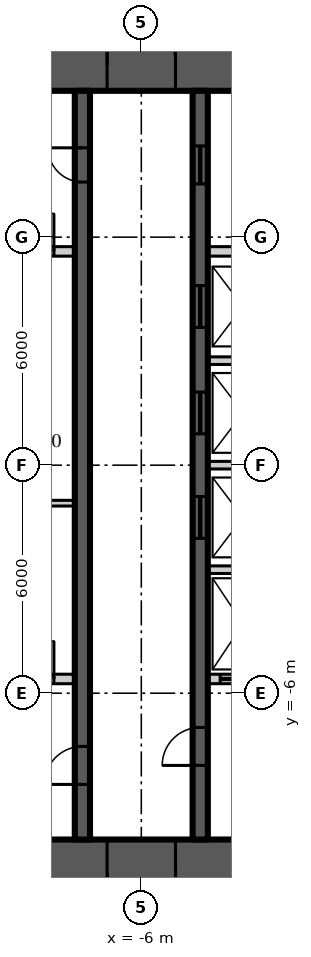
"""IFC4 building model, lengths in metres.
Left out: names, types, materials, properties, quantities, classifications, styles, units other than length and angle.
Written with IfcOpenShell. Run it as: python <this file> out.ifc"""

import sys

from ifc_helpers import new_model, si_unit, direction, frame, frame_2d, origin, place, context, subcontext, project, spatial, rectangle, extrude, element, fill, save


model = new_model("IFC4")
c1 = context("Model", 3, precision=1e-05, world=origin(), true_north=direction((0.0, 1.0)))
c2 = subcontext(c1, "Body", "Model", "MODEL_VIEW")
j1 = project(units=[si_unit("LENGTHUNIT", "METRE"), si_unit("PLANEANGLEUNIT", "RADIAN")], contexts=[c1])
p1 = place(None, origin())
s1 = spatial("IfcSite", under=j1, at=p1, CompositionType="ELEMENT")
p2 = place(p1, origin())
s2 = spatial("IfcBuilding", under=s1, at=p2, CompositionType="ELEMENT")
p3 = place(p2, frame((0.0, 0.0, 139.8)))
s3 = spatial("IfcBuildingStorey", under=s2, at=p3, CompositionType="ELEMENT", Elevation=139.8)
p4 = place(p3, frame((-11.15, 10.5, 0.0), z_axis=(0.0, 0.0, 1.0), x_axis=(1.0, 0.0, 0.0)))
e1 = element("IfcWall", 1, at=p4, inside=s3, PredefinedType="SHEAR", context=c2, shape_type="SweptSolid", body=[
    extrude(rectangle(XDim=22.3, YDim=1.3, at=frame_2d((11.15, 0.0))), origin(), (0.0, 0.0, 1.0), 3.9),
])
p5 = place(p4, frame((4.25, 0.0, 0.0)))
e2 = element("IfcOpeningElement", 2, at=p5, cuts=e1, PredefinedType="OPENING", context=c2, shape_type="SweptSolid", body=[
    extrude(rectangle(XDim=1.8, YDim=2.2, at=frame_2d((0.9, 1.1))), frame((0.0, 0.66, 0.0), z_axis=(0.0, -1.0, 0.0), x_axis=(1.0, 0.0, 0.0)), (0.0, 0.0, 1.0), 1.32),
])
p6 = place(p4, frame((16.25, 0.0, 0.0)))
e3 = element("IfcOpeningElement", 3, at=p6, cuts=e1, PredefinedType="OPENING", context=c2, shape_type="SweptSolid", body=[
    extrude(rectangle(XDim=1.8, YDim=2.2, at=frame_2d((0.9, 1.1))), frame((0.0, 0.66, 0.0), z_axis=(0.0, -1.0, 0.0), x_axis=(1.0, 0.0, 0.0)), (0.0, 0.0, 1.0), 1.32),
])
p7 = place(p3, frame((11.15, -10.5, 0.0), z_axis=(0.0, 0.0, 1.0), x_axis=(-1.0, 0.0, 0.0)))
e4 = element("IfcWall", 4, at=p7, inside=s3, PredefinedType="SHEAR", context=c2, shape_type="SweptSolid", body=[
    extrude(rectangle(XDim=22.3, YDim=1.3, at=frame_2d((11.15, 0.0))), origin(), (0.0, 0.0, 1.0), 3.9),
])
p8 = place(p7, frame((16.25, 0.0, 0.0)))
e5 = element("IfcOpeningElement", 5, at=p8, cuts=e4, PredefinedType="OPENING", context=c2, shape_type="SweptSolid", body=[
    extrude(rectangle(XDim=1.8, YDim=2.2, at=frame_2d((0.9, 1.1))), frame((0.0, 0.66, 0.0), z_axis=(0.0, -1.0, 0.0), x_axis=(1.0, 0.0, 0.0)), (0.0, 0.0, 1.0), 1.32),
])
p9 = place(p7, frame((4.25, 0.0, 0.0)))
e6 = element("IfcOpeningElement", 6, at=p9, cuts=e4, PredefinedType="OPENING", context=c2, shape_type="SweptSolid", body=[
    extrude(rectangle(XDim=1.8, YDim=2.2, at=frame_2d((0.9, 1.1))), frame((0.0, 0.66, 0.0), z_axis=(0.0, -1.0, 0.0), x_axis=(1.0, 0.0, 0.0)), (0.0, 0.0, 1.0), 1.32),
])
p10 = place(p3, frame((-7.55, -9.85, 0.0), z_axis=(0.0, 0.0, 1.0), x_axis=(0.0, 1.0, 0.0)))
e7 = element("IfcWall", 7, at=p10, inside=s3, PredefinedType="SHEAR", context=c2, shape_type="SweptSolid", body=[
    extrude(rectangle(XDim=19.7, YDim=0.4, at=frame_2d((9.85, 0.0))), origin(), (0.0, 0.0, 1.0), 3.9),
])
p11 = place(p10, frame((1.45, 0.0, 0.0)))
e8 = element("IfcOpeningElement", 8, at=p11, cuts=e7, PredefinedType="OPENING", context=c2, shape_type="SweptSolid", body=[
    extrude(rectangle(XDim=1.0, YDim=2.2, at=frame_2d((0.5, 1.1))), frame((0.0, 0.21, 0.0), z_axis=(0.0, -1.0, 0.0), x_axis=(1.0, 0.0, 0.0)), (0.0, 0.0, 1.0), 0.42),
])
p12 = place(p10, frame((17.3, 0.0, 0.0)))
e9 = element("IfcOpeningElement", 9, at=p12, cuts=e7, PredefinedType="OPENING", context=c2, shape_type="SweptSolid", body=[
    extrude(rectangle(XDim=0.9, YDim=2.1, at=frame_2d((0.45, 1.05))), frame((0.0, 0.21, 0.0), z_axis=(0.0, -1.0, 0.0), x_axis=(1.0, 0.0, 0.0)), (0.0, 0.0, 1.0), 0.42),
])
p13 = place(p3, frame((-4.45, -9.85, 0.0), z_axis=(0.0, 0.0, 1.0), x_axis=(0.0, 1.0, 0.0)))
e10 = element("IfcWall", 10, at=p13, inside=s3, PredefinedType="SHEAR", context=c2, shape_type="SweptSolid", body=[
    extrude(rectangle(XDim=19.7, YDim=0.4, at=frame_2d((9.85, 0.0))), origin(), (0.0, 0.0, 1.0), 3.9),
])
p14 = place(p13, frame((1.95, 0.0, 0.0)))
e11 = element("IfcOpeningElement", 11, at=p14, cuts=e10, PredefinedType="OPENING", context=c2, shape_type="SweptSolid", body=[
    extrude(rectangle(XDim=1.0, YDim=2.2, at=frame_2d((0.5, 1.1))), frame((0.0, 0.21, 0.0), z_axis=(0.0, -1.0, 0.0), x_axis=(1.0, 0.0, 0.0)), (0.0, 0.0, 1.0), 0.42),
])
p15 = place(p13, frame((17.25, 0.0, 0.0)))
e12 = element("IfcOpeningElement", 12, at=p15, cuts=e10, PredefinedType="OPENING", context=c2, shape_type="SweptSolid", body=[
    extrude(rectangle(XDim=1.0, YDim=2.1, at=frame_2d((0.5, 1.05))), frame((0.0, 0.21, 0.0), z_axis=(0.0, -1.0, 0.0), x_axis=(1.0, 0.0, 0.0)), (0.0, 0.0, 1.0), 0.42),
])
p16 = place(p13, frame((7.925, 0.0, 0.0)))
e13 = element("IfcOpeningElement", 13, at=p16, cuts=e10, PredefinedType="OPENING", context=c2, shape_type="SweptSolid", body=[
    extrude(rectangle(XDim=1.1, YDim=2.2, at=frame_2d((0.55, 1.1))), frame((0.0, 0.21, 0.0), z_axis=(0.0, -1.0, 0.0), x_axis=(1.0, 0.0, 0.0)), (0.0, 0.0, 1.0), 0.42),
])
p17 = place(p13, frame((10.675, 0.0, 0.0)))
e14 = element("IfcOpeningElement", 14, at=p17, cuts=e10, PredefinedType="OPENING", context=c2, shape_type="SweptSolid", body=[
    extrude(rectangle(XDim=1.1, YDim=2.2, at=frame_2d((0.55, 1.1))), frame((0.0, 0.21, 0.0), z_axis=(0.0, -1.0, 0.0), x_axis=(1.0, 0.0, 0.0)), (0.0, 0.0, 1.0), 0.42),
])
p18 = place(p13, frame((13.475, 0.0, 0.0)))
e15 = element("IfcOpeningElement", 15, at=p18, cuts=e10, PredefinedType="OPENING", context=c2, shape_type="SweptSolid", body=[
    extrude(rectangle(XDim=1.1, YDim=2.2, at=frame_2d((0.55, 1.1))), frame((0.0, 0.21, 0.0), z_axis=(0.0, -1.0, 0.0), x_axis=(1.0, 0.0, 0.0)), (0.0, 0.0, 1.0), 0.42),
])
p19 = place(p3, frame((-9.85, 5.625, 0.0), z_axis=(0.0, 0.0, 1.0), x_axis=(1.0, 0.0, 0.0)))
e16 = element("IfcWall", 16, at=p19, inside=s3, PredefinedType="SOLIDWALL", context=c2, shape_type="SweptSolid", body=[
    extrude(rectangle(XDim=2.1, YDim=0.25, at=frame_2d((1.05, 0.0))), origin(), (0.0, 0.0, 1.0), 3.7),
])
p20 = place(p19, frame((0.55, 0.0, 0.0)))
e17 = element("IfcOpeningElement", 17, at=p20, cuts=e16, PredefinedType="OPENING", context=c2, shape_type="SweptSolid", body=[
    extrude(rectangle(XDim=1.0, YDim=2.2, at=frame_2d((0.5, 1.1))), frame((0.0, 0.135, 0.0), z_axis=(0.0, -1.0, 0.0), x_axis=(1.0, 0.0, 0.0)), (0.0, 0.0, 1.0), 0.27),
])
p21 = place(p3, frame((-4.25, 5.625, 0.0), z_axis=(0.0, 0.0, 1.0), x_axis=(1.0, 0.0, 0.0)))
e18 = element("IfcWall", 18, at=p21, inside=s3, PredefinedType="SOLIDWALL", context=c2, shape_type="SweptSolid", body=[
    extrude(rectangle(XDim=1.85, YDim=0.25, at=frame_2d((0.925, 0.0))), origin(), (0.0, 0.0, 1.0), 3.7),
])
p22 = place(p3, frame((-9.85, -5.625, 0.0), z_axis=(0.0, 0.0, 1.0), x_axis=(1.0, 0.0, 0.0)))
e19 = element("IfcWall", 19, at=p22, inside=s3, PredefinedType="SOLIDWALL", context=c2, shape_type="SweptSolid", body=[
    extrude(rectangle(XDim=2.1, YDim=0.25, at=frame_2d((1.05, 0.0))), origin(), (0.0, 0.0, 1.0), 3.7),
])
p23 = place(p22, frame((0.55, 0.0, 0.0)))
e20 = element("IfcOpeningElement", 20, at=p23, cuts=e19, PredefinedType="OPENING", context=c2, shape_type="SweptSolid", body=[
    extrude(rectangle(XDim=1.0, YDim=2.2, at=frame_2d((0.5, 1.1))), frame((0.0, 0.135, 0.0), z_axis=(0.0, -1.0, 0.0), x_axis=(1.0, 0.0, 0.0)), (0.0, 0.0, 1.0), 0.27),
])
p24 = place(p3, frame((-4.25, -5.625, 0.0), z_axis=(0.0, 0.0, 1.0), x_axis=(1.0, 0.0, 0.0)))
e21 = element("IfcWall", 21, at=p24, inside=s3, PredefinedType="SOLIDWALL", context=c2, shape_type="SweptSolid", body=[
    extrude(rectangle(XDim=1.85, YDim=0.25, at=frame_2d((0.925, 0.0))), origin(), (0.0, 0.0, 1.0), 3.7),
])
p25 = place(p24, frame((0.325, 0.0, 0.0)))
e22 = element("IfcOpeningElement", 22, at=p25, cuts=e21, PredefinedType="OPENING", context=c2, shape_type="SweptSolid", body=[
    extrude(rectangle(XDim=1.2, YDim=2.2, at=frame_2d((0.6, 1.1))), frame((0.0, 0.135, 0.0), z_axis=(0.0, -1.0, 0.0), x_axis=(1.0, 0.0, 0.0)), (0.0, 0.0, 1.0), 0.27),
])
for number, where, z_axis, x_axis in (
    (23, (-4.25, -2.75, 0.0), (0.0, 0.0, 1.0), (1.0, 0.0, 0.0)),
    (24, (-4.25, 0.0, 0.0), (0.0, 0.0, 1.0), (1.0, 0.0, 0.0)),
    (25, (-4.25, 2.75, 0.0), (0.0, 0.0, 1.0), (1.0, 0.0, 0.0)),
):
    element("IfcWall", number, at=place(p3, frame(where, z_axis=z_axis, x_axis=x_axis)), inside=s3, PredefinedType="SOLIDWALL", context=c2, shape_type="SweptSolid", body=[
        extrude(rectangle(XDim=1.85, YDim=0.2, at=frame_2d((0.925, 0.0))), origin(), (0.0, 0.0, 1.0), 3.7),
    ])
p26 = place(p3, frame((-9.85, -1.0, 0.0), z_axis=(0.0, 0.0, 1.0), x_axis=(1.0, 0.0, 0.0)))
e26 = element("IfcWall", 26, at=p26, inside=s3, PredefinedType="SOLIDWALL", context=c2, shape_type="SweptSolid", body=[
    extrude(rectangle(XDim=2.1, YDim=0.15, at=frame_2d((1.05, 0.0))), origin(), (0.0, 0.0, 1.0), 3.77),
])
p27 = place(p5, origin())
e27 = element("IfcDoor", 27, at=p27, inside=s3, OperationType="DOUBLE_DOOR_DOUBLE_SWING", PredefinedType="DOOR", context=c2, shape_type="SweptSolid", body=[
    extrude(rectangle(XDim=1.8, YDim=2.2, at=frame_2d((0.9, 1.1))), frame((0.0, 0.025, 0.0), z_axis=(0.0, -1.0, 0.0), x_axis=(1.0, 0.0, 0.0)), (0.0, 0.0, 1.0), 0.05),
])
fill(e2, e27)
p28 = place(p8, origin())
e28 = element("IfcDoor", 28, at=p28, inside=s3, OperationType="DOUBLE_DOOR_DOUBLE_SWING", PredefinedType="DOOR", context=c2, shape_type="SweptSolid", body=[
    extrude(rectangle(XDim=1.8, YDim=2.2, at=frame_2d((0.9, 1.1))), frame((0.0, 0.025, 0.0), z_axis=(0.0, -1.0, 0.0), x_axis=(1.0, 0.0, 0.0)), (0.0, 0.0, 1.0), 0.05),
])
fill(e5, e28)
p29 = place(p11, origin())
e29 = element("IfcDoor", 29, at=p29, inside=s3, OperationType="SINGLE_SWING_LEFT", PredefinedType="DOOR", context=c2, shape_type="SweptSolid", body=[
    extrude(rectangle(XDim=1.0, YDim=2.2, at=frame_2d((0.5, 1.1))), frame((0.0, 0.025, 0.0), z_axis=(0.0, -1.0, 0.0), x_axis=(1.0, 0.0, 0.0)), (0.0, 0.0, 1.0), 0.05),
])
fill(e8, e29)
p30 = place(p14, origin())
e30 = element("IfcDoor", 30, at=p30, inside=s3, OperationType="SINGLE_SWING_LEFT", PredefinedType="DOOR", context=c2, shape_type="SweptSolid", body=[
    extrude(rectangle(XDim=1.0, YDim=2.2, at=frame_2d((0.5, 1.1))), frame((0.0, 0.025, 0.0), z_axis=(0.0, -1.0, 0.0), x_axis=(1.0, 0.0, 0.0)), (0.0, 0.0, 1.0), 0.05),
])
fill(e11, e30)
p31 = place(p12, origin())
e31 = element("IfcDoor", 31, at=p31, inside=s3, OperationType="SINGLE_SWING_RIGHT", PredefinedType="DOOR", context=c2, shape_type="SweptSolid", body=[
    extrude(rectangle(XDim=0.9, YDim=2.1, at=frame_2d((0.45, 1.05))), frame((0.0, 0.025, 0.0), z_axis=(0.0, -1.0, 0.0), x_axis=(1.0, 0.0, 0.0)), (0.0, 0.0, 1.0), 0.05),
])
fill(e9, e31)
p32 = place(p15, origin())
e32 = element("IfcDoor", 32, at=p32, inside=s3, OperationType="SLIDING_TO_LEFT", PredefinedType="DOOR", context=c2, shape_type="SweptSolid", body=[
    extrude(rectangle(XDim=1.0, YDim=2.1, at=frame_2d((0.5, 1.05))), frame((0.0, 0.025, 0.0), z_axis=(0.0, -1.0, 0.0), x_axis=(1.0, 0.0, 0.0)), (0.0, 0.0, 1.0), 0.05),
])
fill(e12, e32)
p33 = place(p16, origin())
e33 = element("IfcDoor", 33, at=p33, inside=s3, OperationType="SLIDING_TO_LEFT", PredefinedType="DOOR", context=c2, shape_type="SweptSolid", body=[
    extrude(rectangle(XDim=1.1, YDim=2.2, at=frame_2d((0.55, 1.1))), frame((0.0, 0.025, 0.0), z_axis=(0.0, -1.0, 0.0), x_axis=(1.0, 0.0, 0.0)), (0.0, 0.0, 1.0), 0.05),
])
fill(e13, e33)
p34 = place(p17, origin())
e34 = element("IfcDoor", 34, at=p34, inside=s3, OperationType="SLIDING_TO_LEFT", PredefinedType="DOOR", context=c2, shape_type="SweptSolid", body=[
    extrude(rectangle(XDim=1.1, YDim=2.2, at=frame_2d((0.55, 1.1))), frame((0.0, 0.025, 0.0), z_axis=(0.0, -1.0, 0.0), x_axis=(1.0, 0.0, 0.0)), (0.0, 0.0, 1.0), 0.05),
])
fill(e14, e34)
p35 = place(p18, origin())
e35 = element("IfcDoor", 35, at=p35, inside=s3, OperationType="SLIDING_TO_LEFT", PredefinedType="DOOR", context=c2, shape_type="SweptSolid", body=[
    extrude(rectangle(XDim=1.1, YDim=2.2, at=frame_2d((0.55, 1.1))), frame((0.0, 0.025, 0.0), z_axis=(0.0, -1.0, 0.0), x_axis=(1.0, 0.0, 0.0)), (0.0, 0.0, 1.0), 0.05),
])
fill(e15, e35)
p36 = place(p25, origin())
e36 = element("IfcDoor", 36, at=p36, inside=s3, OperationType="SLIDING_TO_LEFT", PredefinedType="DOOR", context=c2, shape_type="SweptSolid", body=[
    extrude(rectangle(XDim=1.2, YDim=2.2, at=frame_2d((0.6, 1.1))), frame((0.0, 0.025, 0.0), z_axis=(0.0, -1.0, 0.0), x_axis=(1.0, 0.0, 0.0)), (0.0, 0.0, 1.0), 0.05),
])
fill(e22, e36)
p37 = place(p20, origin())
e37 = element("IfcDoor", 37, at=p37, inside=s3, OperationType="SINGLE_SWING_RIGHT", PredefinedType="DOOR", context=c2, shape_type="SweptSolid", body=[
    extrude(rectangle(XDim=1.0, YDim=2.2, at=frame_2d((0.5, 1.1))), frame((0.0, 0.025, 0.0), z_axis=(0.0, -1.0, 0.0), x_axis=(1.0, 0.0, 0.0)), (0.0, 0.0, 1.0), 0.05),
])
fill(e17, e37)
p38 = place(p23, origin())
e38 = element("IfcDoor", 38, at=p38, inside=s3, OperationType="SINGLE_SWING_RIGHT", PredefinedType="DOOR", context=c2, shape_type="SweptSolid", body=[
    extrude(rectangle(XDim=1.0, YDim=2.2, at=frame_2d((0.5, 1.1))), frame((0.0, 0.025, 0.0), z_axis=(0.0, -1.0, 0.0), x_axis=(1.0, 0.0, 0.0)), (0.0, 0.0, 1.0), 0.05),
])
fill(e20, e38)
save(model, sys.argv[1])
